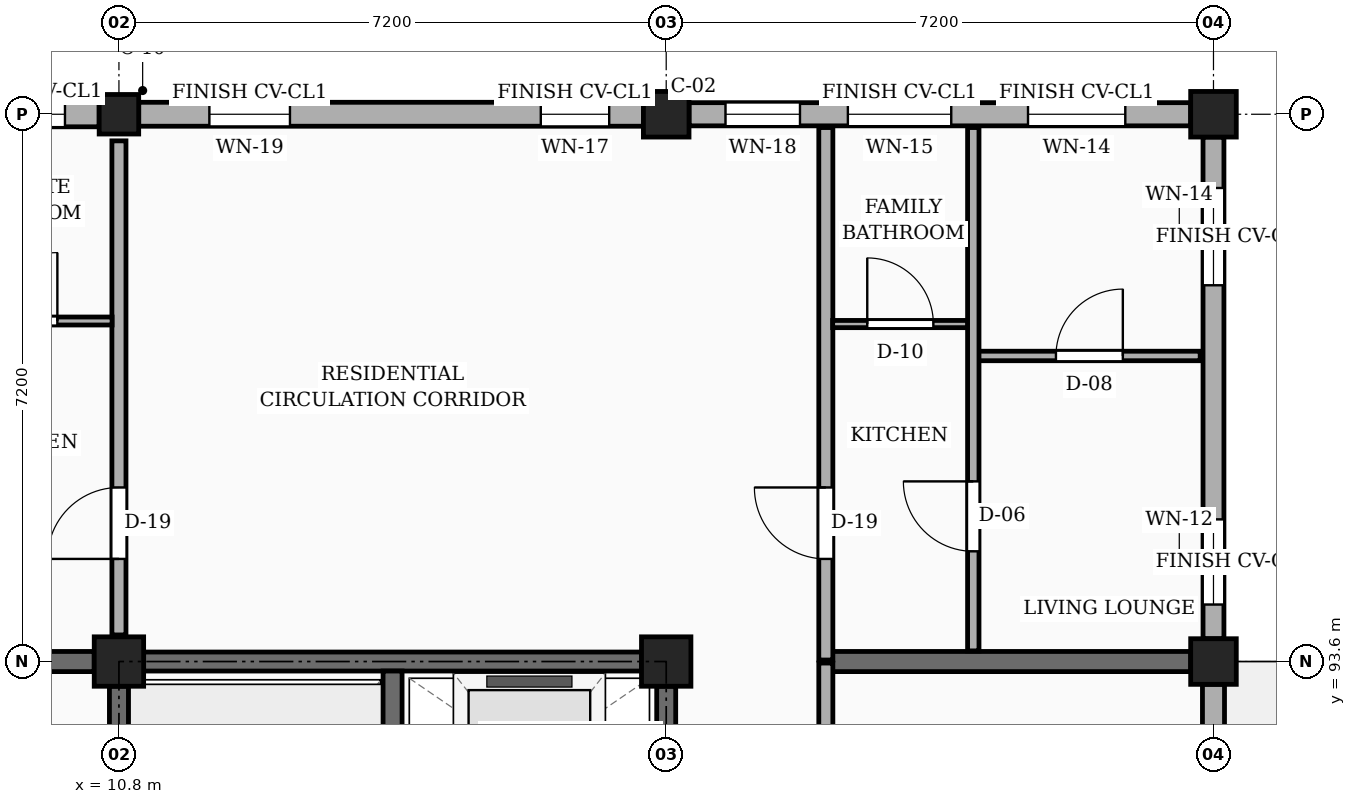
"""IFC4 building model, lengths in metres.
Left out: names, types, materials, properties, quantities, classifications, styles, units other than length and angle.
Written with IfcOpenShell. Run it as: python <this file> out.ifc"""

import sys

from ifc_helpers import new_model, si_unit, direction, frame, frame_2d, origin, origin_2d, place, context, subcontext, project, spatial, rectangle, circle, extrude, element, fill, save


model = new_model("IFC4")
c1 = context("Model", 3, precision=1e-05, world=origin(), true_north=direction((0.0, 1.0)))
c2 = subcontext(c1, "Body", "Model", "MODEL_VIEW")
j1 = project(units=[si_unit("LENGTHUNIT", "METRE"), si_unit("PLANEANGLEUNIT", "RADIAN")], contexts=[c1])
p1 = place(None, origin())
s1 = spatial("IfcSite", under=j1, at=p1, CompositionType="ELEMENT")
p2 = place(p1, origin())
s2 = spatial("IfcBuilding", under=s1, at=p2, CompositionType="ELEMENT")
p3 = place(p2, origin())
s3 = spatial("IfcBuildingStorey", under=s2, at=p3, CompositionType="ELEMENT", Elevation=0.0)
p4 = place(p3, frame((10.8, 93.6, 0.0), z_axis=(0.0, 0.0, 1.0), x_axis=(1.0, 0.0, 0.0)))
e1 = element("IfcColumn", 1, at=p4, inside=s3, PredefinedType="COLUMN", context=c2, shape_type="SweptSolid", body=[
    extrude(rectangle(XDim=0.65, YDim=0.65, at=origin_2d()), origin(), (0.0, 0.0, 1.0), 4.5),
])
p5 = place(p3, frame((10.8, 100.8, 0.0), z_axis=(0.0, 0.0, 1.0), x_axis=(1.0, 0.0, 0.0)))
e2 = element("IfcColumn", 2, at=p5, inside=s3, PredefinedType="COLUMN", context=c2, shape_type="SweptSolid", body=[
    extrude(circle(Radius=0.26, at=origin_2d()), origin(), (0.0, 0.0, 1.0), 4.5),
])
p6 = place(p3, frame((18.0, 93.6, 0.0), z_axis=(0.0, 0.0, 1.0), x_axis=(1.0, 0.0, 0.0)))
e3 = element("IfcColumn", 3, at=p6, inside=s3, PredefinedType="COLUMN", context=c2, shape_type="SweptSolid", body=[
    extrude(rectangle(XDim=0.65, YDim=0.65, at=origin_2d()), origin(), (0.0, 0.0, 1.0), 4.5),
])
for number, where, z_axis, x_axis in (
    (4, (18.0, 100.8, 0.0), (0.0, 0.0, 1.0), (1.0, 0.0, 0.0)),
    (5, (25.2, 93.6, 0.0), (0.0, 0.0, 1.0), (1.0, 0.0, 0.0)),
    (6, (25.2, 100.8, 0.0), (0.0, 0.0, 1.0), (1.0, 0.0, 0.0)),
):
    element("IfcColumn", number, at=place(p3, frame(where, z_axis=z_axis, x_axis=x_axis)), inside=s3, PredefinedType="COLUMN", context=c2, shape_type="SweptSolid", body=[
        extrude(rectangle(XDim=0.6, YDim=0.6, at=origin_2d()), origin(), (0.0, 0.0, 1.0), 4.5),
    ])
p7 = place(p3, frame((3.9, 93.6, 0.0), z_axis=(0.0, 0.0, 1.0), x_axis=(1.0, 0.0, 0.0)))
e7 = element("IfcWall", 7, at=p7, inside=s3, PredefinedType="SOLIDWALL", context=c2, shape_type="SweptSolid", body=[
    extrude(rectangle(XDim=6.575, YDim=0.265, at=frame_2d((3.288, 0.0))), origin(), (0.0, 0.0, 1.0), 3.56),
])
p8 = place(p3, frame((20.1, 93.6, 0.0), z_axis=(0.0, 0.0, 1.0), x_axis=(1.0, 0.0, 0.0)))
e8 = element("IfcWall", 8, at=p8, inside=s3, PredefinedType="SOLIDWALL", context=c2, shape_type="SweptSolid", body=[
    extrude(rectangle(XDim=4.8, YDim=0.265, at=frame_2d((2.4, 0.0))), origin(), (0.0, 0.0, 1.0), 3.56),
])
p9 = place(p3, frame((25.2, 86.66, 0.0), z_axis=(0.0, 0.0, 1.0), x_axis=(0.0, 1.0, 0.0)))
e9 = element("IfcWall", 9, at=p9, inside=s3, PredefinedType="SOLIDWALL", context=c2, shape_type="SweptSolid", body=[
    extrude(rectangle(XDim=6.64, YDim=0.29, at=frame_2d((3.32, 0.0))), origin(), (0.0, 0.0, 1.0), 3.83),
])
p10 = place(p9, frame((2.695, 0.0, 0.0)))
e10 = element("IfcOpeningElement", 10, at=p10, cuts=e9, PredefinedType="OPENING", context=c2, shape_type="SweptSolid", body=[
    extrude(rectangle(XDim=1.25, YDim=2.15, at=frame_2d((0.625, 1.075))), frame((0.0, 0.155, 0.0), z_axis=(0.0, -1.0, 0.0), x_axis=(1.0, 0.0, 0.0)), (0.0, 0.0, 1.0), 0.31),
])
p11 = place(p3, frame((25.2, 93.9, 0.0), z_axis=(0.0, 0.0, 1.0), x_axis=(0.0, 1.0, 0.0)))
e11 = element("IfcWall", 11, at=p11, inside=s3, PredefinedType="SOLIDWALL", context=c2, shape_type="SweptSolid", body=[
    extrude(rectangle(XDim=6.6, YDim=0.275, at=frame_2d((3.3, 0.0))), origin(), (0.0, 0.0, 1.0), 3.83),
])
p12 = place(p11, frame((0.45, 0.0, 0.78)))
e12 = element("IfcOpeningElement", 12, at=p12, cuts=e11, PredefinedType="OPENING", context=c2, shape_type="SweptSolid", body=[
    extrude(rectangle(XDim=1.12, YDim=1.26, at=frame_2d((0.56, 0.63))), frame((0.0, 0.147, 0.0), z_axis=(0.0, -1.0, 0.0), x_axis=(1.0, 0.0, 0.0)), (0.0, 0.0, 1.0), 0.295),
])
p13 = place(p11, frame((4.65, 0.0, 0.78)))
e13 = element("IfcOpeningElement", 13, at=p13, cuts=e11, PredefinedType="OPENING", context=c2, shape_type="SweptSolid", body=[
    extrude(rectangle(XDim=1.28, YDim=1.26, at=frame_2d((0.64, 0.63))), frame((0.0, 0.147, 0.0), z_axis=(0.0, -1.0, 0.0), x_axis=(1.0, 0.0, 0.0)), (0.0, 0.0, 1.0), 0.295),
])
p14 = place(p3, frame((24.9, 100.8, 0.0), z_axis=(0.0, 0.0, 1.0), x_axis=(-1.0, 0.0, 0.0)))
e14 = element("IfcWall", 14, at=p14, inside=s3, PredefinedType="SOLIDWALL", context=c2, shape_type="SweptSolid", body=[
    extrude(rectangle(XDim=6.6, YDim=0.305, at=frame_2d((3.3, 0.0))), origin(), (0.0, 0.0, 1.0), 3.83),
])
p15 = place(p14, frame((0.86, 0.0, 0.78)))
e15 = element("IfcOpeningElement", 15, at=p15, cuts=e14, PredefinedType="OPENING", context=c2, shape_type="SweptSolid", body=[
    extrude(rectangle(XDim=1.28, YDim=1.26, at=frame_2d((0.64, 0.63))), frame((0.0, 0.163, 0.0), z_axis=(0.0, -1.0, 0.0), x_axis=(1.0, 0.0, 0.0)), (0.0, 0.0, 1.0), 0.325),
])
p16 = place(p14, frame((3.15, 0.0, 0.78)))
e16 = element("IfcOpeningElement", 16, at=p16, cuts=e14, PredefinedType="OPENING", context=c2, shape_type="SweptSolid", body=[
    extrude(rectangle(XDim=1.36, YDim=1.26, at=frame_2d((0.68, 0.63))), frame((0.0, 0.163, 0.0), z_axis=(0.0, -1.0, 0.0), x_axis=(1.0, 0.0, 0.0)), (0.0, 0.0, 1.0), 0.325),
])
p17 = place(p14, frame((5.14, 0.0, 0.78)))
e17 = element("IfcOpeningElement", 17, at=p17, cuts=e14, PredefinedType="OPENING", context=c2, shape_type="SweptSolid", body=[
    extrude(rectangle(XDim=0.98, YDim=1.36, at=frame_2d((0.49, 0.68))), frame((0.0, 0.163, 0.0), z_axis=(0.0, -1.0, 0.0), x_axis=(1.0, 0.0, 0.0)), (0.0, 0.0, 1.0), 0.325),
])
p18 = place(p3, frame((17.7, 100.8, 0.0), z_axis=(0.0, 0.0, 1.0), x_axis=(-1.0, 0.0, 0.0)))
e18 = element("IfcWall", 18, at=p18, inside=s3, PredefinedType="SOLIDWALL", context=c2, shape_type="SweptSolid", body=[
    extrude(rectangle(XDim=6.64, YDim=0.315, at=frame_2d((3.32, 0.0))), origin(), (0.0, 0.0, 1.0), 3.83),
])
p19 = place(p18, frame((0.45, 0.0, 0.78)))
e19 = element("IfcOpeningElement", 19, at=p19, cuts=e18, PredefinedType="OPENING", context=c2, shape_type="SweptSolid", body=[
    extrude(rectangle(XDim=0.9, YDim=1.36, at=frame_2d((0.45, 0.68))), frame((0.0, 0.167, 0.0), z_axis=(0.0, -1.0, 0.0), x_axis=(1.0, 0.0, 0.0)), (0.0, 0.0, 1.0), 0.335),
])
p20 = place(p18, frame((4.65, 0.0, 0.78)))
e20 = element("IfcOpeningElement", 20, at=p20, cuts=e18, PredefinedType="OPENING", context=c2, shape_type="SweptSolid", body=[
    extrude(rectangle(XDim=1.06, YDim=1.36, at=frame_2d((0.53, 0.68))), frame((0.0, 0.167, 0.0), z_axis=(0.0, -1.0, 0.0), x_axis=(1.0, 0.0, 0.0)), (0.0, 0.0, 1.0), 0.335),
])
p21 = place(p3, frame((10.54, 100.8, 0.0), z_axis=(0.0, 0.0, 1.0), x_axis=(-1.0, 0.0, 0.0)))
e21 = element("IfcWall", 21, at=p21, inside=s3, PredefinedType="SOLIDWALL", context=c2, shape_type="SweptSolid", body=[
    extrude(rectangle(XDim=6.64, YDim=0.33, at=frame_2d((3.32, 0.0))), origin(), (0.0, 0.0, 1.0), 3.83),
])
p22 = place(p21, frame((0.45, 0.0, 0.78)))
e22 = element("IfcOpeningElement", 22, at=p22, cuts=e21, PredefinedType="OPENING", context=c2, shape_type="SweptSolid", body=[
    extrude(rectangle(XDim=1.06, YDim=1.36, at=frame_2d((0.53, 0.68))), frame((0.0, 0.175, 0.0), z_axis=(0.0, -1.0, 0.0), x_axis=(1.0, 0.0, 0.0)), (0.0, 0.0, 1.0), 0.35),
])
p23 = place(p21, frame((4.65, 0.0, 0.78)))
e23 = element("IfcOpeningElement", 23, at=p23, cuts=e21, PredefinedType="OPENING", context=c2, shape_type="SweptSolid", body=[
    extrude(rectangle(XDim=1.22, YDim=1.36, at=frame_2d((0.61, 0.68))), frame((0.0, 0.175, 0.0), z_axis=(0.0, -1.0, 0.0), x_axis=(1.0, 0.0, 0.0)), (0.0, 0.0, 1.0), 0.35),
])
p24 = place(p3, frame((10.8, 86.725, 0.0), z_axis=(0.0, 0.0, 1.0), x_axis=(0.0, 1.0, 0.0)))
e24 = element("IfcWall", 24, at=p24, inside=s3, PredefinedType="SHEAR", context=c2, shape_type="SweptSolid", body=[
    extrude(rectangle(XDim=6.55, YDim=0.25, at=frame_2d((3.275, 0.0))), origin(), (0.0, 0.0, 1.0), 4.26),
])
p25 = place(p3, frame((11.125, 93.6, 0.0), z_axis=(0.0, 0.0, 1.0), x_axis=(1.0, 0.0, 0.0)))
e25 = element("IfcWall", 25, at=p25, inside=s3, PredefinedType="SHEAR", context=c2, shape_type="SweptSolid", body=[
    extrude(rectangle(XDim=6.55, YDim=0.25, at=frame_2d((3.275, 0.0))), origin(), (0.0, 0.0, 1.0), 4.26),
])
p26 = place(p3, frame((18.0, 86.725, 0.0), z_axis=(0.0, 0.0, 1.0), x_axis=(0.0, 1.0, 0.0)))
e26 = element("IfcWall", 26, at=p26, inside=s3, PredefinedType="SHEAR", context=c2, shape_type="SweptSolid", body=[
    extrude(rectangle(XDim=6.55, YDim=0.25, at=frame_2d((3.275, 0.0))), origin(), (0.0, 0.0, 1.0), 4.26),
])
p27 = place(p26, frame((1.5, 0.0, 0.0)))
e27 = element("IfcOpeningElement", 27, at=p27, cuts=e26, PredefinedType="OPENING", context=c2, shape_type="SweptSolid", body=[
    extrude(rectangle(XDim=1.1, YDim=2.15, at=frame_2d((0.55, 1.075))), frame((0.0, 0.135, 0.0), z_axis=(0.0, -1.0, 0.0), x_axis=(1.0, 0.0, 0.0)), (0.0, 0.0, 1.0), 0.27),
])
p28 = place(p3, frame((14.4, 86.525, 0.0), z_axis=(0.0, 0.0, 1.0), x_axis=(0.0, 1.0, 0.0)))
e28 = element("IfcWall", 28, at=p28, inside=s3, PredefinedType="SHEAR", context=c2, shape_type="SweptSolid", body=[
    extrude(rectangle(XDim=6.95, YDim=0.25, at=frame_2d((3.475, 0.0))), origin(), (0.0, 0.0, 1.0), 4.26),
])
p29 = place(p28, frame((0.475, 0.0, 0.0)))
e29 = element("IfcOpeningElement", 29, at=p29, cuts=e28, PredefinedType="OPENING", context=c2, shape_type="SweptSolid", body=[
    extrude(rectangle(XDim=1.05, YDim=2.15, at=frame_2d((0.525, 1.075))), frame((0.0, 0.135, 0.0), z_axis=(0.0, -1.0, 0.0), x_axis=(1.0, 0.0, 0.0)), (0.0, 0.0, 1.0), 0.27),
])
p30 = place(p3, frame((20.1, 86.42, 0.0), z_axis=(0.0, 0.0, 1.0), x_axis=(0.0, 1.0, 0.0)))
e30 = element("IfcWall", 30, at=p30, inside=s3, PredefinedType="PARTITIONING", context=c2, shape_type="SweptSolid", body=[
    extrude(rectangle(XDim=7.16, YDim=0.185, at=frame_2d((3.58, 0.0))), origin(), (0.0, 0.0, 1.0), 3.695),
])
p31 = place(p30, frame((4.33, 0.0, 0.0)))
e31 = element("IfcOpeningElement", 31, at=p31, cuts=e30, PredefinedType="OPENING", context=c2, shape_type="SweptSolid", body=[
    extrude(rectangle(XDim=1.1, YDim=2.15, at=frame_2d((0.55, 1.075))), frame((0.0, 0.103, 0.0), z_axis=(0.0, -1.0, 0.0), x_axis=(1.0, 0.0, 0.0)), (0.0, 0.0, 1.0), 0.205),
])
p32 = place(p3, frame((20.1, 93.62, 0.0), z_axis=(0.0, 0.0, 1.0), x_axis=(0.0, 1.0, 0.0)))
e32 = element("IfcWall", 32, at=p32, inside=s3, PredefinedType="PARTITIONING", context=c2, shape_type="SweptSolid", body=[
    extrude(rectangle(XDim=7.005, YDim=0.185, at=frame_2d((3.502, 0.0))), origin(), (0.0, 0.0, 1.0), 3.695),
])
p33 = place(p32, frame((1.33, 0.0, 0.0)))
e33 = element("IfcOpeningElement", 33, at=p33, cuts=e32, PredefinedType="OPENING", context=c2, shape_type="SweptSolid", body=[
    extrude(rectangle(XDim=0.94, YDim=2.12, at=frame_2d((0.47, 1.06))), frame((0.0, 0.103, 0.0), z_axis=(0.0, -1.0, 0.0), x_axis=(1.0, 0.0, 0.0)), (0.0, 0.0, 1.0), 0.205),
])
p34 = place(p3, frame((10.8, 93.95, 0.0), z_axis=(0.0, 0.0, 1.0), x_axis=(0.0, 1.0, 0.0)))
e34 = element("IfcWall", 34, at=p34, inside=s3, PredefinedType="PARTITIONING", context=c2, shape_type="SweptSolid", body=[
    extrude(rectangle(XDim=6.5, YDim=0.185, at=frame_2d((3.25, 0.0))), origin(), (0.0, 0.0, 1.0), 3.51),
])
p35 = place(p34, frame((1.0, 0.0, 0.0)))
e35 = element("IfcOpeningElement", 35, at=p35, cuts=e34, PredefinedType="OPENING", context=c2, shape_type="SweptSolid", body=[
    extrude(rectangle(XDim=0.94, YDim=2.12, at=frame_2d((0.47, 1.06))), frame((0.0, 0.103, 0.0), z_axis=(0.0, -1.0, 0.0), x_axis=(1.0, 0.0, 0.0)), (0.0, 0.0, 1.0), 0.205),
])
p36 = place(p3, frame((8.37, 98.08, 0.0), z_axis=(0.0, 0.0, 1.0), x_axis=(1.0, 0.0, 0.0)))
e36 = element("IfcWall", 36, at=p36, inside=s3, PredefinedType="PARTITIONING", context=c2, shape_type="SweptSolid", body=[
    extrude(rectangle(XDim=2.34, YDim=0.105, at=frame_2d((1.17, 0.0))), origin(), (0.0, 0.0, 1.0), 3.695),
])
p37 = place(p36, frame((0.72, 0.0, 0.0)))
e37 = element("IfcOpeningElement", 37, at=p37, cuts=e36, PredefinedType="OPENING", context=c2, shape_type="SweptSolid", body=[
    extrude(rectangle(XDim=0.9, YDim=2.05, at=frame_2d((0.45, 1.025))), frame((0.0, 0.062, 0.0), z_axis=(0.0, -1.0, 0.0), x_axis=(1.0, 0.0, 0.0)), (0.0, 0.0, 1.0), 0.125),
])
p38 = place(p3, frame((22.11, 97.62, 0.0), z_axis=(0.0, 0.0, 1.0), x_axis=(1.0, 0.0, 0.0)))
e38 = element("IfcWall", 38, at=p38, inside=s3, PredefinedType="PARTITIONING", context=c2, shape_type="SweptSolid", body=[
    extrude(rectangle(XDim=2.915, YDim=0.125, at=frame_2d((1.458, 0.0))), origin(), (0.0, 0.0, 1.0), 3.695),
])
p39 = place(p38, frame((1.018, 0.0, 0.0)))
e39 = element("IfcOpeningElement", 39, at=p39, cuts=e38, PredefinedType="OPENING", context=c2, shape_type="SweptSolid", body=[
    extrude(rectangle(XDim=0.88, YDim=2.08, at=frame_2d((0.44, 1.04))), frame((0.0, 0.073, 0.0), z_axis=(0.0, -1.0, 0.0), x_axis=(1.0, 0.0, 0.0)), (0.0, 0.0, 1.0), 0.145),
])
p40 = place(p3, frame((20.19, 98.04, 0.0), z_axis=(0.0, 0.0, 1.0), x_axis=(1.0, 0.0, 0.0)))
e40 = element("IfcWall", 40, at=p40, inside=s3, PredefinedType="PARTITIONING", context=c2, shape_type="SweptSolid", body=[
    extrude(rectangle(XDim=1.78, YDim=0.095, at=frame_2d((0.89, 0.0))), origin(), (0.0, 0.0, 1.0), 3.695),
])
p41 = place(p40, frame((0.455, 0.0, 0.0)))
e41 = element("IfcOpeningElement", 41, at=p41, cuts=e40, PredefinedType="OPENING", context=c2, shape_type="SweptSolid", body=[
    extrude(rectangle(XDim=0.87, YDim=2.05, at=frame_2d((0.435, 1.025))), frame((0.0, 0.058, 0.0), z_axis=(0.0, -1.0, 0.0), x_axis=(1.0, 0.0, 0.0)), (0.0, 0.0, 1.0), 0.115),
])
p42 = place(p3, frame((22.04, 93.74, 0.0), z_axis=(0.0, 0.0, 1.0), x_axis=(0.0, 1.0, 0.0)))
e42 = element("IfcWall", 42, at=p42, inside=s3, PredefinedType="PARTITIONING", context=c2, shape_type="SweptSolid", body=[
    extrude(rectangle(XDim=6.885, YDim=0.15, at=frame_2d((3.442, 0.0))), origin(), (0.0, 0.0, 1.0), 3.695),
])
p43 = place(p42, frame((1.31, 0.0, 0.0)))
e43 = element("IfcOpeningElement", 43, at=p43, cuts=e42, PredefinedType="OPENING", context=c2, shape_type="SweptSolid", body=[
    extrude(rectangle(XDim=0.92, YDim=2.1, at=frame_2d((0.46, 1.05))), frame((0.0, 0.085, 0.0), z_axis=(0.0, -1.0, 0.0), x_axis=(1.0, 0.0, 0.0)), (0.0, 0.0, 1.0), 0.17),
])
p44 = place(p12, origin())
e44 = element("IfcWindow", 44, at=p44, inside=s3, PartitioningType="SINGLE_PANEL", PredefinedType="WINDOW", context=c2, shape_type="SweptSolid", body=[
    extrude(rectangle(XDim=1.12, YDim=1.26, at=frame_2d((0.56, 0.63))), frame((0.0, 0.03, 0.0), z_axis=(0.0, -1.0, 0.0), x_axis=(1.0, 0.0, 0.0)), (0.0, 0.0, 1.0), 0.06),
])
fill(e12, e44)
p45 = place(p13, origin())
e45 = element("IfcWindow", 45, at=p45, inside=s3, PartitioningType="SINGLE_PANEL", PredefinedType="WINDOW", context=c2, shape_type="SweptSolid", body=[
    extrude(rectangle(XDim=1.28, YDim=1.26, at=frame_2d((0.64, 0.63))), frame((0.0, 0.03, 0.0), z_axis=(0.0, -1.0, 0.0), x_axis=(1.0, 0.0, 0.0)), (0.0, 0.0, 1.0), 0.06),
])
fill(e13, e45)
p46 = place(p15, origin())
e46 = element("IfcWindow", 46, at=p46, inside=s3, PartitioningType="SINGLE_PANEL", PredefinedType="WINDOW", context=c2, shape_type="SweptSolid", body=[
    extrude(rectangle(XDim=1.28, YDim=1.26, at=frame_2d((0.64, 0.63))), frame((0.0, 0.03, 0.0), z_axis=(0.0, -1.0, 0.0), x_axis=(1.0, 0.0, 0.0)), (0.0, 0.0, 1.0), 0.06),
])
fill(e15, e46)
p47 = place(p16, origin())
e47 = element("IfcWindow", 47, at=p47, inside=s3, PartitioningType="SINGLE_PANEL", PredefinedType="WINDOW", context=c2, shape_type="SweptSolid", body=[
    extrude(rectangle(XDim=1.36, YDim=1.26, at=frame_2d((0.68, 0.63))), frame((0.0, 0.03, 0.0), z_axis=(0.0, -1.0, 0.0), x_axis=(1.0, 0.0, 0.0)), (0.0, 0.0, 1.0), 0.06),
])
fill(e16, e47)
p48 = place(p17, origin())
e48 = element("IfcWindow", 48, at=p48, inside=s3, PartitioningType="SINGLE_PANEL", PredefinedType="WINDOW", context=c2, shape_type="SweptSolid", body=[
    extrude(rectangle(XDim=0.98, YDim=1.36, at=frame_2d((0.49, 0.68))), frame((0.0, 0.03, 0.0), z_axis=(0.0, -1.0, 0.0), x_axis=(1.0, 0.0, 0.0)), (0.0, 0.0, 1.0), 0.06),
])
fill(e17, e48)
p49 = place(p19, origin())
e49 = element("IfcWindow", 49, at=p49, inside=s3, PartitioningType="SINGLE_PANEL", PredefinedType="WINDOW", context=c2, shape_type="SweptSolid", body=[
    extrude(rectangle(XDim=0.9, YDim=1.36, at=frame_2d((0.45, 0.68))), frame((0.0, 0.03, 0.0), z_axis=(0.0, -1.0, 0.0), x_axis=(1.0, 0.0, 0.0)), (0.0, 0.0, 1.0), 0.06),
])
fill(e19, e49)
p50 = place(p20, origin())
e50 = element("IfcWindow", 50, at=p50, inside=s3, PartitioningType="SINGLE_PANEL", PredefinedType="WINDOW", context=c2, shape_type="SweptSolid", body=[
    extrude(rectangle(XDim=1.06, YDim=1.36, at=frame_2d((0.53, 0.68))), frame((0.0, 0.03, 0.0), z_axis=(0.0, -1.0, 0.0), x_axis=(1.0, 0.0, 0.0)), (0.0, 0.0, 1.0), 0.06),
])
fill(e20, e50)
p51 = place(p22, origin())
e51 = element("IfcWindow", 51, at=p51, inside=s3, PartitioningType="SINGLE_PANEL", PredefinedType="WINDOW", context=c2, shape_type="SweptSolid", body=[
    extrude(rectangle(XDim=1.06, YDim=1.36, at=frame_2d((0.53, 0.68))), frame((0.0, 0.03, 0.0), z_axis=(0.0, -1.0, 0.0), x_axis=(1.0, 0.0, 0.0)), (0.0, 0.0, 1.0), 0.06),
])
fill(e22, e51)
p52 = place(p33, origin())
e52 = element("IfcDoor", 52, at=p52, inside=s3, OperationType="SINGLE_SWING_RIGHT", PredefinedType="DOOR", context=c2, shape_type="SweptSolid", body=[
    extrude(rectangle(XDim=0.94, YDim=2.12, at=frame_2d((0.47, 1.06))), frame((0.0, 0.025, 0.0), z_axis=(0.0, -1.0, 0.0), x_axis=(1.0, 0.0, 0.0)), (0.0, 0.0, 1.0), 0.05),
])
fill(e33, e52)
p53 = place(p35, origin())
e53 = element("IfcDoor", 53, at=p53, inside=s3, OperationType="SINGLE_SWING_LEFT", PredefinedType="DOOR", context=c2, shape_type="SweptSolid", body=[
    extrude(rectangle(XDim=0.94, YDim=2.12, at=frame_2d((0.47, 1.06))), frame((0.0, 0.025, 0.0), z_axis=(0.0, -1.0, 0.0), x_axis=(1.0, 0.0, 0.0)), (0.0, 0.0, 1.0), 0.05),
])
fill(e35, e53)
p54 = place(p37, origin())
e54 = element("IfcDoor", 54, at=p54, inside=s3, OperationType="SINGLE_SWING_RIGHT", PredefinedType="DOOR", context=c2, shape_type="SweptSolid", body=[
    extrude(rectangle(XDim=0.9, YDim=2.05, at=frame_2d((0.45, 1.025))), frame((0.0, 0.025, 0.0), z_axis=(0.0, -1.0, 0.0), x_axis=(1.0, 0.0, 0.0)), (0.0, 0.0, 1.0), 0.05),
])
fill(e37, e54)
p55 = place(p39, origin())
e55 = element("IfcDoor", 55, at=p55, inside=s3, OperationType="SINGLE_SWING_RIGHT", PredefinedType="DOOR", context=c2, shape_type="SweptSolid", body=[
    extrude(rectangle(XDim=0.88, YDim=2.08, at=frame_2d((0.44, 1.04))), frame((0.0, 0.025, 0.0), z_axis=(0.0, -1.0, 0.0), x_axis=(1.0, 0.0, 0.0)), (0.0, 0.0, 1.0), 0.05),
])
fill(e39, e55)
p56 = place(p41, origin())
e56 = element("IfcDoor", 56, at=p56, inside=s3, OperationType="SINGLE_SWING_LEFT", PredefinedType="DOOR", context=c2, shape_type="SweptSolid", body=[
    extrude(rectangle(XDim=0.87, YDim=2.05, at=frame_2d((0.435, 1.025))), frame((0.0, 0.025, 0.0), z_axis=(0.0, -1.0, 0.0), x_axis=(1.0, 0.0, 0.0)), (0.0, 0.0, 1.0), 0.05),
])
fill(e41, e56)
p57 = place(p43, origin())
e57 = element("IfcDoor", 57, at=p57, inside=s3, OperationType="SINGLE_SWING_RIGHT", PredefinedType="DOOR", context=c2, shape_type="SweptSolid", body=[
    extrude(rectangle(XDim=0.92, YDim=2.1, at=frame_2d((0.46, 1.05))), frame((0.0, 0.025, 0.0), z_axis=(0.0, -1.0, 0.0), x_axis=(1.0, 0.0, 0.0)), (0.0, 0.0, 1.0), 0.05),
])
fill(e43, e57)
save(model, sys.argv[1])
